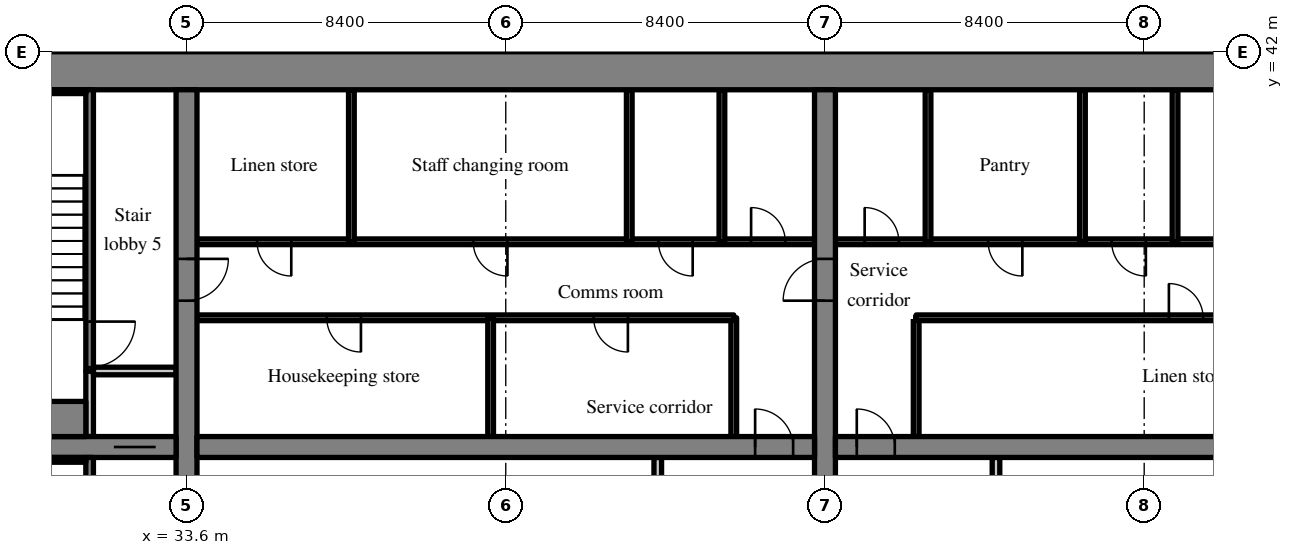
"""IFC4 building model, lengths in metres.
Left out: names, types, materials, properties, quantities, classifications, styles, units other than length and angle.
Written with IfcOpenShell. Run it as: python <this file> out.ifc"""

import sys

from ifc_helpers import new_model, si_unit, direction, frame, frame_2d, origin, place, context, subcontext, project, spatial, rectangle, extrude, source, transform, mapped, element, fill, save


model = new_model("IFC4")
c1 = context("Model", 3, precision=1e-05, world=origin(), true_north=direction((0.0, 1.0)))
c2 = subcontext(c1, "Body", "Model", "MODEL_VIEW")
j1 = project(units=[si_unit("LENGTHUNIT", "METRE"), si_unit("PLANEANGLEUNIT", "RADIAN")], contexts=[c1])
p1 = place(None, origin())
s1 = spatial("IfcSite", under=j1, at=p1, CompositionType="ELEMENT")
p2 = place(p1, origin())
s2 = spatial("IfcBuilding", under=s1, at=p2, CompositionType="ELEMENT")
p3 = place(p2, frame((0.0, 0.0, 73.4)))
s3 = spatial("IfcBuildingStorey", under=s2, at=p3, CompositionType="ELEMENT", Elevation=73.4)
m1 = source(origin(), c2, "Body", "SweptSolid", [
    extrude(rectangle(XDim=50.4, YDim=1.0, at=frame_2d((25.2, 0.0))), origin(), (0.0, 0.0, 1.0), 3.52),
])
p4 = place(p3, frame((25.2, 41.5, 0.0), z_axis=(0.0, 0.0, 1.0), x_axis=(1.0, 0.0, 0.0)))
e1 = element("IfcWall", 1, at=p4, inside=s3, PredefinedType="SHEAR", context=c2, shape_type="MappedRepresentation", body=[
    mapped(m1, transform((0.0, 0.0, 0.0), scale=1.0)),
])
m2 = source(origin(), c2, "Body", "SweptSolid", [
    extrude(rectangle(XDim=18.0, YDim=0.55, at=frame_2d((9.0, 0.0))), origin(), (0.0, 0.0, 1.0), 3.52),
])
p5 = place(p3, frame((33.6, 23.0, 0.0), z_axis=(0.0, 0.0, 1.0), x_axis=(0.0, 1.0, 0.0)))
e2 = element("IfcWall", 2, at=p5, inside=s3, PredefinedType="SHEAR", context=c2, shape_type="MappedRepresentation", body=[
    mapped(m2, transform((0.0, 0.0, 0.0), scale=1.0)),
])
m3 = source(origin(), c2, "Body", "SweptSolid", [
    extrude(rectangle(XDim=1.1, YDim=2.1, at=frame_2d((0.55, 1.05))), frame((0.0, 0.285, 0.0), z_axis=(0.0, -1.0, 0.0), x_axis=(1.0, 0.0, 0.0)), (0.0, 0.0, 1.0), 0.57),
])
p6 = place(p5, frame((12.45, 0.0, 0.0)))
e3 = element("IfcOpeningElement", 3, at=p6, cuts=e2, PredefinedType="OPENING", context=c2, shape_type="MappedRepresentation", body=[
    mapped(m3, transform((0.0, 0.0, 0.0), scale=1.0)),
])
p7 = place(p3, frame((50.4, 23.0, 0.0), z_axis=(0.0, 0.0, 1.0), x_axis=(0.0, 1.0, 0.0)))
e4 = element("IfcWall", 4, at=p7, inside=s3, PredefinedType="SHEAR", context=c2, shape_type="MappedRepresentation", body=[
    mapped(m2, transform((0.0, 0.0, 0.0), scale=1.0)),
])
p8 = place(p7, frame((12.45, 0.0, 0.0)))
e5 = element("IfcOpeningElement", 5, at=p8, cuts=e4, PredefinedType="OPENING", context=c2, shape_type="MappedRepresentation", body=[
    mapped(m3, transform((0.0, 0.0, 0.0), scale=1.0)),
])
m4 = source(origin(), c2, "Body", "SweptSolid", [
    extrude(rectangle(XDim=7.125, YDim=0.55, at=frame_2d((3.562, 0.0))), origin(), (0.0, 0.0, 1.0), 3.52),
])
p9 = place(p3, frame((26.2, 31.6, 0.0), z_axis=(0.0, 0.0, 1.0), x_axis=(1.0, 0.0, 0.0)))
e6 = element("IfcWall", 6, at=p9, inside=s3, PredefinedType="SHEAR", context=c2, shape_type="MappedRepresentation", body=[
    mapped(m4, transform((0.0, 0.0, 0.0), scale=1.0)),
])
p10 = place(p9, frame((5.488, 0.0, 0.0)))
e7 = element("IfcOpeningElement", 7, at=p10, cuts=e6, PredefinedType="OPENING", context=c2, shape_type="MappedRepresentation", body=[
    mapped(m3, transform((0.0, 0.0, 0.0), scale=1.0)),
])
m5 = source(origin(), c2, "Body", "SweptSolid", [
    extrude(rectangle(XDim=16.25, YDim=0.55, at=frame_2d((8.125, 0.0))), origin(), (0.0, 0.0, 1.0), 3.52),
])
p11 = place(p3, frame((33.875, 31.6, 0.0), z_axis=(0.0, 0.0, 1.0), x_axis=(1.0, 0.0, 0.0)))
e8 = element("IfcWall", 8, at=p11, inside=s3, PredefinedType="SHEAR", context=c2, shape_type="MappedRepresentation", body=[
    mapped(m5, transform((0.0, 0.0, 0.0), scale=1.0)),
])
m6 = source(origin(), c2, "Body", "SweptSolid", [
    extrude(rectangle(XDim=1.0, YDim=2.1, at=frame_2d((0.5, 1.05))), frame((0.0, 0.285, 0.0), z_axis=(0.0, -1.0, 0.0), x_axis=(1.0, 0.0, 0.0)), (0.0, 0.0, 1.0), 0.57),
])
p12 = place(p11, frame((14.687, 0.0, 0.0)))
e9 = element("IfcOpeningElement", 9, at=p12, cuts=e8, PredefinedType="OPENING", context=c2, shape_type="MappedRepresentation", body=[
    mapped(m6, transform((0.0, 0.0, 0.0), scale=1.0)),
])
p13 = place(p3, frame((50.675, 31.6, 0.0), z_axis=(0.0, 0.0, 1.0), x_axis=(1.0, 0.0, 0.0)))
e10 = element("IfcWall", 10, at=p13, inside=s3, PredefinedType="SHEAR", context=c2, shape_type="MappedRepresentation", body=[
    mapped(m5, transform((0.0, 0.0, 0.0), scale=1.0)),
])
p14 = place(p13, frame((0.562, 0.0, 0.0)))
e11 = element("IfcOpeningElement", 11, at=p14, cuts=e10, PredefinedType="OPENING", context=c2, shape_type="MappedRepresentation", body=[
    mapped(m6, transform((0.0, 0.0, 0.0), scale=1.0)),
])
m7 = source(origin(), c2, "Body", "SweptSolid", [
    extrude(rectangle(XDim=2.525, YDim=0.2, at=frame_2d((1.262, 0.0))), origin(), (0.0, 0.0, 1.0), 3.52),
])
p15 = place(p3, frame((46.0, 28.8, 0.0), z_axis=(0.0, 0.0, 1.0), x_axis=(0.0, 1.0, 0.0)))
e12 = element("IfcWall", 12, at=p15, inside=s3, PredefinedType="SOLIDWALL", context=c2, shape_type="MappedRepresentation", body=[
    mapped(m7, transform((0.0, 0.0, 0.0), scale=1.0)),
])
m8 = source(origin(), c2, "Body", "SweptSolid", [
    extrude(rectangle(XDim=3.125, YDim=0.15, at=frame_2d((1.562, 0.0))), origin(), (0.0, 0.0, 1.0), 3.52),
])
p16 = place(p3, frame((48.0, 31.875, 0.0), z_axis=(0.0, 0.0, 1.0), x_axis=(0.0, 1.0, 0.0)))
e13 = element("IfcWall", 13, at=p16, inside=s3, PredefinedType="PARTITIONING", context=c2, shape_type="MappedRepresentation", body=[
    mapped(m8, transform((0.0, 0.0, 0.0), scale=1.0)),
])
m9 = source(origin(), c2, "Body", "SweptSolid", [
    extrude(rectangle(XDim=14.125, YDim=0.15, at=frame_2d((7.062, 0.0))), origin(), (0.0, 0.0, 1.0), 3.52),
])
p17 = place(p3, frame((33.875, 35.0, 0.0), z_axis=(0.0, 0.0, 1.0), x_axis=(1.0, 0.0, 0.0)))
e14 = element("IfcWall", 14, at=p17, inside=s3, PredefinedType="PARTITIONING", context=c2, shape_type="MappedRepresentation", body=[
    mapped(m9, transform((0.0, 0.0, 0.0), scale=1.0)),
])
m10 = source(origin(), c2, "Body", "SweptSolid", [
    extrude(rectangle(XDim=0.9, YDim=2.1, at=frame_2d((0.45, 1.05))), frame((0.0, 0.085, 0.0), z_axis=(0.0, -1.0, 0.0), x_axis=(1.0, 0.0, 0.0)), (0.0, 0.0, 1.0), 0.17),
])
p18 = place(p17, frame((3.414, 0.0, 0.0)))
e15 = element("IfcOpeningElement", 15, at=p18, cuts=e14, PredefinedType="OPENING", context=c2, shape_type="MappedRepresentation", body=[
    mapped(m10, transform((0.0, 0.0, 0.0), scale=1.0)),
])
p19 = place(p17, frame((10.439, 0.0, 0.0)))
e16 = element("IfcOpeningElement", 16, at=p19, cuts=e14, PredefinedType="OPENING", context=c2, shape_type="MappedRepresentation", body=[
    mapped(m10, transform((0.0, 0.0, 0.0), scale=1.0)),
])
m11 = source(origin(), c2, "Body", "SweptSolid", [
    extrude(rectangle(XDim=16.25, YDim=0.15, at=frame_2d((8.125, 0.0))), origin(), (0.0, 0.0, 1.0), 3.52),
])
p20 = place(p3, frame((33.875, 37.0, 0.0), z_axis=(0.0, 0.0, 1.0), x_axis=(1.0, 0.0, 0.0)))
e17 = element("IfcWall", 17, at=p20, inside=s3, PredefinedType="PARTITIONING", context=c2, shape_type="MappedRepresentation", body=[
    mapped(m11, transform((0.0, 0.0, 0.0), scale=1.0)),
])
p21 = place(p20, frame((1.581, 0.0, 0.0)))
e18 = element("IfcOpeningElement", 18, at=p21, cuts=e17, PredefinedType="OPENING", context=c2, shape_type="MappedRepresentation", body=[
    mapped(m10, transform((0.0, 0.0, 0.0), scale=1.0)),
])
p22 = place(p20, frame((7.269, 0.0, 0.0)))
e19 = element("IfcOpeningElement", 19, at=p22, cuts=e17, PredefinedType="OPENING", context=c2, shape_type="MappedRepresentation", body=[
    mapped(m10, transform((0.0, 0.0, 0.0), scale=1.0)),
])
p23 = place(p20, frame((12.144, 0.0, 0.0)))
e20 = element("IfcOpeningElement", 20, at=p23, cuts=e17, PredefinedType="OPENING", context=c2, shape_type="MappedRepresentation", body=[
    mapped(m10, transform((0.0, 0.0, 0.0), scale=1.0)),
])
p24 = place(p20, frame((14.581, 0.0, 0.0)))
e21 = element("IfcOpeningElement", 21, at=p24, cuts=e17, PredefinedType="OPENING", context=c2, shape_type="MappedRepresentation", body=[
    mapped(m10, transform((0.0, 0.0, 0.0), scale=1.0)),
])
p25 = place(p3, frame((41.602, 31.875, 0.0), z_axis=(0.0, 0.0, 1.0), x_axis=(0.0, 1.0, 0.0)))
e22 = element("IfcWall", 22, at=p25, inside=s3, PredefinedType="PARTITIONING", context=c2, shape_type="MappedRepresentation", body=[
    mapped(m8, transform((0.0, 0.0, 0.0), scale=1.0)),
])
m12 = source(origin(), c2, "Body", "SweptSolid", [
    extrude(rectangle(XDim=4.0, YDim=0.15, at=frame_2d((2.0, 0.0))), origin(), (0.0, 0.0, 1.0), 3.52),
])
for number, where, z_axis, x_axis in (
    (23, (37.938, 37.0, 0.0), (0.0, 0.0, 1.0), (0.0, 1.0, 0.0)),
    (24, (45.25, 37.0, 0.0), (0.0, 0.0, 1.0), (0.0, 1.0, 0.0)),
    (25, (47.688, 37.0, 0.0), (0.0, 0.0, 1.0), (0.0, 1.0, 0.0)),
):
    element("IfcWall", number, at=place(p3, frame(where, z_axis=z_axis, x_axis=x_axis)), inside=s3, PredefinedType="PARTITIONING", context=c2, shape_type="MappedRepresentation", body=[
        mapped(m12, transform((0.0, 0.0, 0.0), scale=1.0)),
    ])
m13 = source(origin(), c2, "Body", "SweptSolid", [
    extrude(rectangle(XDim=8.325, YDim=0.2, at=frame_2d((4.163, 0.0))), origin(), (0.0, 0.0, 1.0), 3.52),
])
p26 = place(p3, frame((54.9, 23.0, 0.0), z_axis=(0.0, 0.0, 1.0), x_axis=(0.0, 1.0, 0.0)))
e26 = element("IfcWall", 26, at=p26, inside=s3, PredefinedType="PARTITIONING", context=c2, shape_type="MappedRepresentation", body=[
    mapped(m13, transform((0.0, 0.0, 0.0), scale=1.0)),
])
p27 = place(p3, frame((52.8, 31.875, 0.0), z_axis=(0.0, 0.0, 1.0), x_axis=(0.0, 1.0, 0.0)))
e27 = element("IfcWall", 27, at=p27, inside=s3, PredefinedType="PARTITIONING", context=c2, shape_type="MappedRepresentation", body=[
    mapped(m8, transform((0.0, 0.0, 0.0), scale=1.0)),
])
p28 = place(p3, frame((66.925, 35.0, 0.0), z_axis=(0.0, 0.0, 1.0), x_axis=(-1.0, 0.0, 0.0)))
e28 = element("IfcWall", 28, at=p28, inside=s3, PredefinedType="PARTITIONING", context=c2, shape_type="MappedRepresentation", body=[
    mapped(m9, transform((0.0, 0.0, 0.0), scale=1.0)),
])
p29 = place(p28, frame((6.575, 0.0, 0.0)))
e29 = element("IfcOpeningElement", 29, at=p29, cuts=e28, PredefinedType="OPENING", context=c2, shape_type="MappedRepresentation", body=[
    mapped(m10, transform((0.0, 0.0, 0.0), scale=1.0)),
])
p30 = place(p3, frame((66.925, 37.0, 0.0), z_axis=(0.0, 0.0, 1.0), x_axis=(-1.0, 0.0, 0.0)))
e30 = element("IfcWall", 30, at=p30, inside=s3, PredefinedType="PARTITIONING", context=c2, shape_type="MappedRepresentation", body=[
    mapped(m11, transform((0.0, 0.0, 0.0), scale=1.0)),
])
p31 = place(p30, frame((3.206, 0.0, 0.0)))
e31 = element("IfcOpeningElement", 31, at=p31, cuts=e30, PredefinedType="OPENING", context=c2, shape_type="MappedRepresentation", body=[
    mapped(m10, transform((0.0, 0.0, 0.0), scale=1.0)),
])
p32 = place(p30, frame((8.081, 0.0, 0.0)))
e32 = element("IfcOpeningElement", 32, at=p32, cuts=e30, PredefinedType="OPENING", context=c2, shape_type="MappedRepresentation", body=[
    mapped(m10, transform((0.0, 0.0, 0.0), scale=1.0)),
])
p33 = place(p30, frame((11.331, 0.0, 0.0)))
e33 = element("IfcOpeningElement", 33, at=p33, cuts=e30, PredefinedType="OPENING", context=c2, shape_type="MappedRepresentation", body=[
    mapped(m10, transform((0.0, 0.0, 0.0), scale=1.0)),
])
p34 = place(p30, frame((14.581, 0.0, 0.0)))
e34 = element("IfcOpeningElement", 34, at=p34, cuts=e30, PredefinedType="OPENING", context=c2, shape_type="MappedRepresentation", body=[
    mapped(m10, transform((0.0, 0.0, 0.0), scale=1.0)),
])
for number, where, z_axis, x_axis in (
    (35, (59.612, 37.0, 0.0), (0.0, 0.0, 1.0), (0.0, 1.0, 0.0)),
    (36, (57.175, 37.0, 0.0), (0.0, 0.0, 1.0), (0.0, 1.0, 0.0)),
    (37, (53.112, 37.0, 0.0), (0.0, 0.0, 1.0), (0.0, 1.0, 0.0)),
):
    element("IfcWall", number, at=place(p3, frame(where, z_axis=z_axis, x_axis=x_axis)), inside=s3, PredefinedType="PARTITIONING", context=c2, shape_type="MappedRepresentation", body=[
        mapped(m12, transform((0.0, 0.0, 0.0), scale=1.0)),
    ])
m14 = source(origin(), c2, "Body", "SweptSolid", [
    extrude(rectangle(XDim=8.325, YDim=0.2, at=frame_2d((4.163, 0.0))), origin(), (0.0, 0.0, 1.0), 3.52),
])
p35 = place(p3, frame((31.05, 23.0, 0.0), z_axis=(0.0, 0.0, 1.0), x_axis=(0.0, 1.0, 0.0)))
e38 = element("IfcWall", 38, at=p35, inside=s3, PredefinedType="SOLIDWALL", context=c2, shape_type="MappedRepresentation", body=[
    mapped(m14, transform((0.0, 0.0, 0.0), scale=1.0)),
])
m15 = source(origin(), c2, "Body", "SweptSolid", [
    extrude(rectangle(XDim=1.2, YDim=2.1, at=frame_2d((0.6, 1.05))), frame((0.0, 0.11, 0.0), z_axis=(0.0, -1.0, 0.0), x_axis=(1.0, 0.0, 0.0)), (0.0, 0.0, 1.0), 0.22),
])
p36 = place(p35, frame((0.6, 0.0, 0.0)))
e39 = element("IfcOpeningElement", 39, at=p36, cuts=e38, PredefinedType="OPENING", context=c2, shape_type="MappedRepresentation", body=[
    mapped(m15, transform((0.0, 0.0, 0.0), scale=1.0)),
])
m16 = source(origin(), c2, "Body", "SweptSolid", [
    extrude(rectangle(XDim=1.725, YDim=0.2, at=frame_2d((0.863, 0.0))), origin(), (0.0, 0.0, 1.0), 3.52),
])
p37 = place(p3, frame((31.05, 31.875, 0.0), z_axis=(0.0, 0.0, 1.0), x_axis=(0.0, 1.0, 0.0)))
e40 = element("IfcWall", 40, at=p37, inside=s3, PredefinedType="SOLIDWALL", context=c2, shape_type="MappedRepresentation", body=[
    mapped(m16, transform((0.0, 0.0, 0.0), scale=1.0)),
])
m17 = source(origin(), c2, "Body", "SweptSolid", [
    extrude(rectangle(XDim=2.175, YDim=0.2, at=frame_2d((1.087, 0.0))), origin(), (0.0, 0.0, 1.0), 3.52),
])
p38 = place(p3, frame((31.15, 33.6, 0.0), z_axis=(0.0, 0.0, 1.0), x_axis=(1.0, 0.0, 0.0)))
e41 = element("IfcWall", 41, at=p38, inside=s3, PredefinedType="SOLIDWALL", context=c2, shape_type="MappedRepresentation", body=[
    mapped(m17, transform((0.0, 0.0, 0.0), scale=1.0)),
])
m18 = source(origin(), c2, "Body", "SweptSolid", [
    extrude(rectangle(XDim=7.4, YDim=0.2, at=frame_2d((3.7, 0.0))), origin(), (0.0, 0.0, 1.0), 3.52),
])
p39 = place(p3, frame((31.05, 33.6, 0.0), z_axis=(0.0, 0.0, 1.0), x_axis=(0.0, 1.0, 0.0)))
e42 = element("IfcWall", 42, at=p39, inside=s3, PredefinedType="SOLIDWALL", context=c2, shape_type="MappedRepresentation", body=[
    mapped(m18, transform((0.0, 0.0, 0.0), scale=1.0)),
])
p40 = place(p39, frame((0.1, 0.0, 0.0)))
e43 = element("IfcOpeningElement", 43, at=p40, cuts=e42, PredefinedType="OPENING", context=c2, shape_type="MappedRepresentation", body=[
    mapped(m15, transform((0.0, 0.0, 0.0), scale=1.0)),
])
m19 = source(origin(), c2, "Body", "SweptSolid", [
    extrude(rectangle(XDim=4.75, YDim=0.125, at=frame_2d((2.375, 0.0))), origin(), (0.0, 0.0, 1.0), 3.52),
])
p41 = place(p3, frame((26.2, 31.262, 0.0), z_axis=(0.0, 0.0, 1.0), x_axis=(1.0, 0.0, 0.0)))
e44 = element("IfcWall", 44, at=p41, inside=s3, PredefinedType="SOLIDWALL", context=c2, shape_type="MappedRepresentation", body=[
    mapped(m19, transform((0.0, 0.0, 0.0), scale=1.0)),
])
m20 = source(origin(), c2, "Body", "SweptSolid", [
    extrude(rectangle(XDim=4.75, YDim=0.1, at=frame_2d((2.375, 0.0))), origin(), (0.0, 0.0, 1.0), 3.52),
])
p42 = place(p3, frame((26.2, 40.95, 0.0), z_axis=(0.0, 0.0, 1.0), x_axis=(1.0, 0.0, 0.0)))
e45 = element("IfcWall", 45, at=p42, inside=s3, PredefinedType="SOLIDWALL", context=c2, shape_type="MappedRepresentation", body=[
    mapped(m20, transform((0.0, 0.0, 0.0), scale=1.0)),
])
m21 = source(origin(), c2, "Body", "SweptSolid", [
    extrude(rectangle(XDim=4.75, YDim=0.925, at=frame_2d((2.375, 0.0))), origin(), (0.0, 0.0, 1.0), 3.52),
])
p43 = place(p3, frame((26.2, 32.337, 0.0), z_axis=(0.0, 0.0, 1.0), x_axis=(1.0, 0.0, 0.0)))
e46 = element("IfcWall", 46, at=p43, inside=s3, PredefinedType="SOLIDWALL", context=c2, shape_type="MappedRepresentation", body=[
    mapped(m21, transform((0.0, 0.0, 0.0), scale=1.0)),
])
m22 = source(origin(), c2, "Body", "SweptSolid", [
    extrude(rectangle(XDim=1.0, YDim=2.1, at=frame_2d((0.5, 1.05))), frame((0.0, 0.025, 0.0), z_axis=(0.0, -1.0, 0.0), x_axis=(1.0, 0.0, 0.0)), (0.0, 0.0, 1.0), 0.05),
])
p44 = place(p12, origin())
e47 = element("IfcDoor", 47, at=p44, inside=s3, OperationType="SINGLE_SWING_LEFT", PredefinedType="DOOR", context=c2, shape_type="MappedRepresentation", body=[
    mapped(m22, transform((0.0, 0.0, 0.0), scale=1.0)),
])
fill(e9, e47)
m23 = source(origin(), c2, "Body", "SweptSolid", [
    extrude(rectangle(XDim=0.9, YDim=2.1, at=frame_2d((0.45, 1.05))), frame((0.0, 0.025, 0.0), z_axis=(0.0, -1.0, 0.0), x_axis=(1.0, 0.0, 0.0)), (0.0, 0.0, 1.0), 0.05),
])
p45 = place(p18, origin())
e48 = element("IfcDoor", 48, at=p45, inside=s3, OperationType="SINGLE_SWING_RIGHT", PredefinedType="DOOR", context=c2, shape_type="MappedRepresentation", body=[
    mapped(m23, transform((0.0, 0.0, 0.0), scale=1.0)),
])
fill(e15, e48)
p46 = place(p19, origin())
e49 = element("IfcDoor", 49, at=p46, inside=s3, OperationType="SINGLE_SWING_RIGHT", PredefinedType="DOOR", context=c2, shape_type="MappedRepresentation", body=[
    mapped(m23, transform((0.0, 0.0, 0.0), scale=1.0)),
])
fill(e16, e49)
p47 = place(p21, origin())
e50 = element("IfcDoor", 50, at=p47, inside=s3, OperationType="SINGLE_SWING_RIGHT", PredefinedType="DOOR", context=c2, shape_type="MappedRepresentation", body=[
    mapped(m23, transform((0.0, 0.0, 0.0), scale=1.0)),
])
fill(e18, e50)
p48 = place(p22, origin())
e51 = element("IfcDoor", 51, at=p48, inside=s3, OperationType="SINGLE_SWING_RIGHT", PredefinedType="DOOR", context=c2, shape_type="MappedRepresentation", body=[
    mapped(m23, transform((0.0, 0.0, 0.0), scale=1.0)),
])
fill(e19, e51)
p49 = place(p23, origin())
e52 = element("IfcDoor", 52, at=p49, inside=s3, OperationType="SINGLE_SWING_RIGHT", PredefinedType="DOOR", context=c2, shape_type="MappedRepresentation", body=[
    mapped(m23, transform((0.0, 0.0, 0.0), scale=1.0)),
])
fill(e20, e52)
p50 = place(p24, origin())
e53 = element("IfcDoor", 53, at=p50, inside=s3, OperationType="SINGLE_SWING_LEFT", PredefinedType="DOOR", context=c2, shape_type="MappedRepresentation", body=[
    mapped(m23, transform((0.0, 0.0, 0.0), scale=1.0)),
])
fill(e21, e53)
p51 = place(p14, origin())
e54 = element("IfcDoor", 54, at=p51, inside=s3, OperationType="SINGLE_SWING_LEFT", PredefinedType="DOOR", context=c2, shape_type="MappedRepresentation", body=[
    mapped(m22, transform((0.0, 0.0, 0.0), scale=1.0)),
])
fill(e11, e54)
p52 = place(p29, origin())
e55 = element("IfcDoor", 55, at=p52, inside=s3, OperationType="SINGLE_SWING_RIGHT", PredefinedType="DOOR", context=c2, shape_type="MappedRepresentation", body=[
    mapped(m23, transform((0.0, 0.0, 0.0), scale=1.0)),
])
fill(e29, e55)
p53 = place(p32, origin())
e56 = element("IfcDoor", 56, at=p53, inside=s3, OperationType="SINGLE_SWING_LEFT", PredefinedType="DOOR", context=c2, shape_type="MappedRepresentation", body=[
    mapped(m23, transform((0.0, 0.0, 0.0), scale=1.0)),
])
fill(e32, e56)
p54 = place(p33, origin())
e57 = element("IfcDoor", 57, at=p54, inside=s3, OperationType="SINGLE_SWING_LEFT", PredefinedType="DOOR", context=c2, shape_type="MappedRepresentation", body=[
    mapped(m23, transform((0.0, 0.0, 0.0), scale=1.0)),
])
fill(e33, e57)
p55 = place(p34, origin())
e58 = element("IfcDoor", 58, at=p55, inside=s3, OperationType="SINGLE_SWING_RIGHT", PredefinedType="DOOR", context=c2, shape_type="MappedRepresentation", body=[
    mapped(m23, transform((0.0, 0.0, 0.0), scale=1.0)),
])
fill(e34, e58)
m24 = source(origin(), c2, "Body", "SweptSolid", [
    extrude(rectangle(XDim=1.1, YDim=2.1, at=frame_2d((0.55, 1.05))), frame((0.0, 0.025, 0.0), z_axis=(0.0, -1.0, 0.0), x_axis=(1.0, 0.0, 0.0)), (0.0, 0.0, 1.0), 0.05),
])
p56 = place(p10, origin())
e59 = element("IfcDoor", 59, at=p56, inside=s3, OperationType="SLIDING_TO_RIGHT", PredefinedType="DOOR", context=c2, shape_type="MappedRepresentation", body=[
    mapped(m24, transform((0.0, 0.0, 0.0), scale=1.0)),
])
fill(e7, e59)
m25 = source(origin(), c2, "Body", "SweptSolid", [
    extrude(rectangle(XDim=1.2, YDim=2.1, at=frame_2d((0.6, 1.05))), frame((0.0, 0.025, 0.0), z_axis=(0.0, -1.0, 0.0), x_axis=(1.0, 0.0, 0.0)), (0.0, 0.0, 1.0), 0.05),
])
p57 = place(p40, origin())
e60 = element("IfcDoor", 60, at=p57, inside=s3, OperationType="SINGLE_SWING_RIGHT", PredefinedType="DOOR", context=c2, shape_type="MappedRepresentation", body=[
    mapped(m25, transform((0.0, 0.0, 0.0), scale=1.0)),
])
fill(e43, e60)
p58 = place(p6, origin())
e61 = element("IfcDoor", 61, at=p58, inside=s3, OperationType="SINGLE_SWING_RIGHT", PredefinedType="DOOR", context=c2, shape_type="MappedRepresentation", body=[
    mapped(m24, transform((0.0, 0.0, 0.0), scale=1.0)),
])
fill(e3, e61)
p59 = place(p8, origin())
e62 = element("IfcDoor", 62, at=p59, inside=s3, OperationType="SINGLE_SWING_LEFT", PredefinedType="DOOR", context=c2, shape_type="MappedRepresentation", body=[
    mapped(m24, transform((0.0, 0.0, 0.0), scale=1.0)),
])
fill(e5, e62)
save(model, sys.argv[1])
